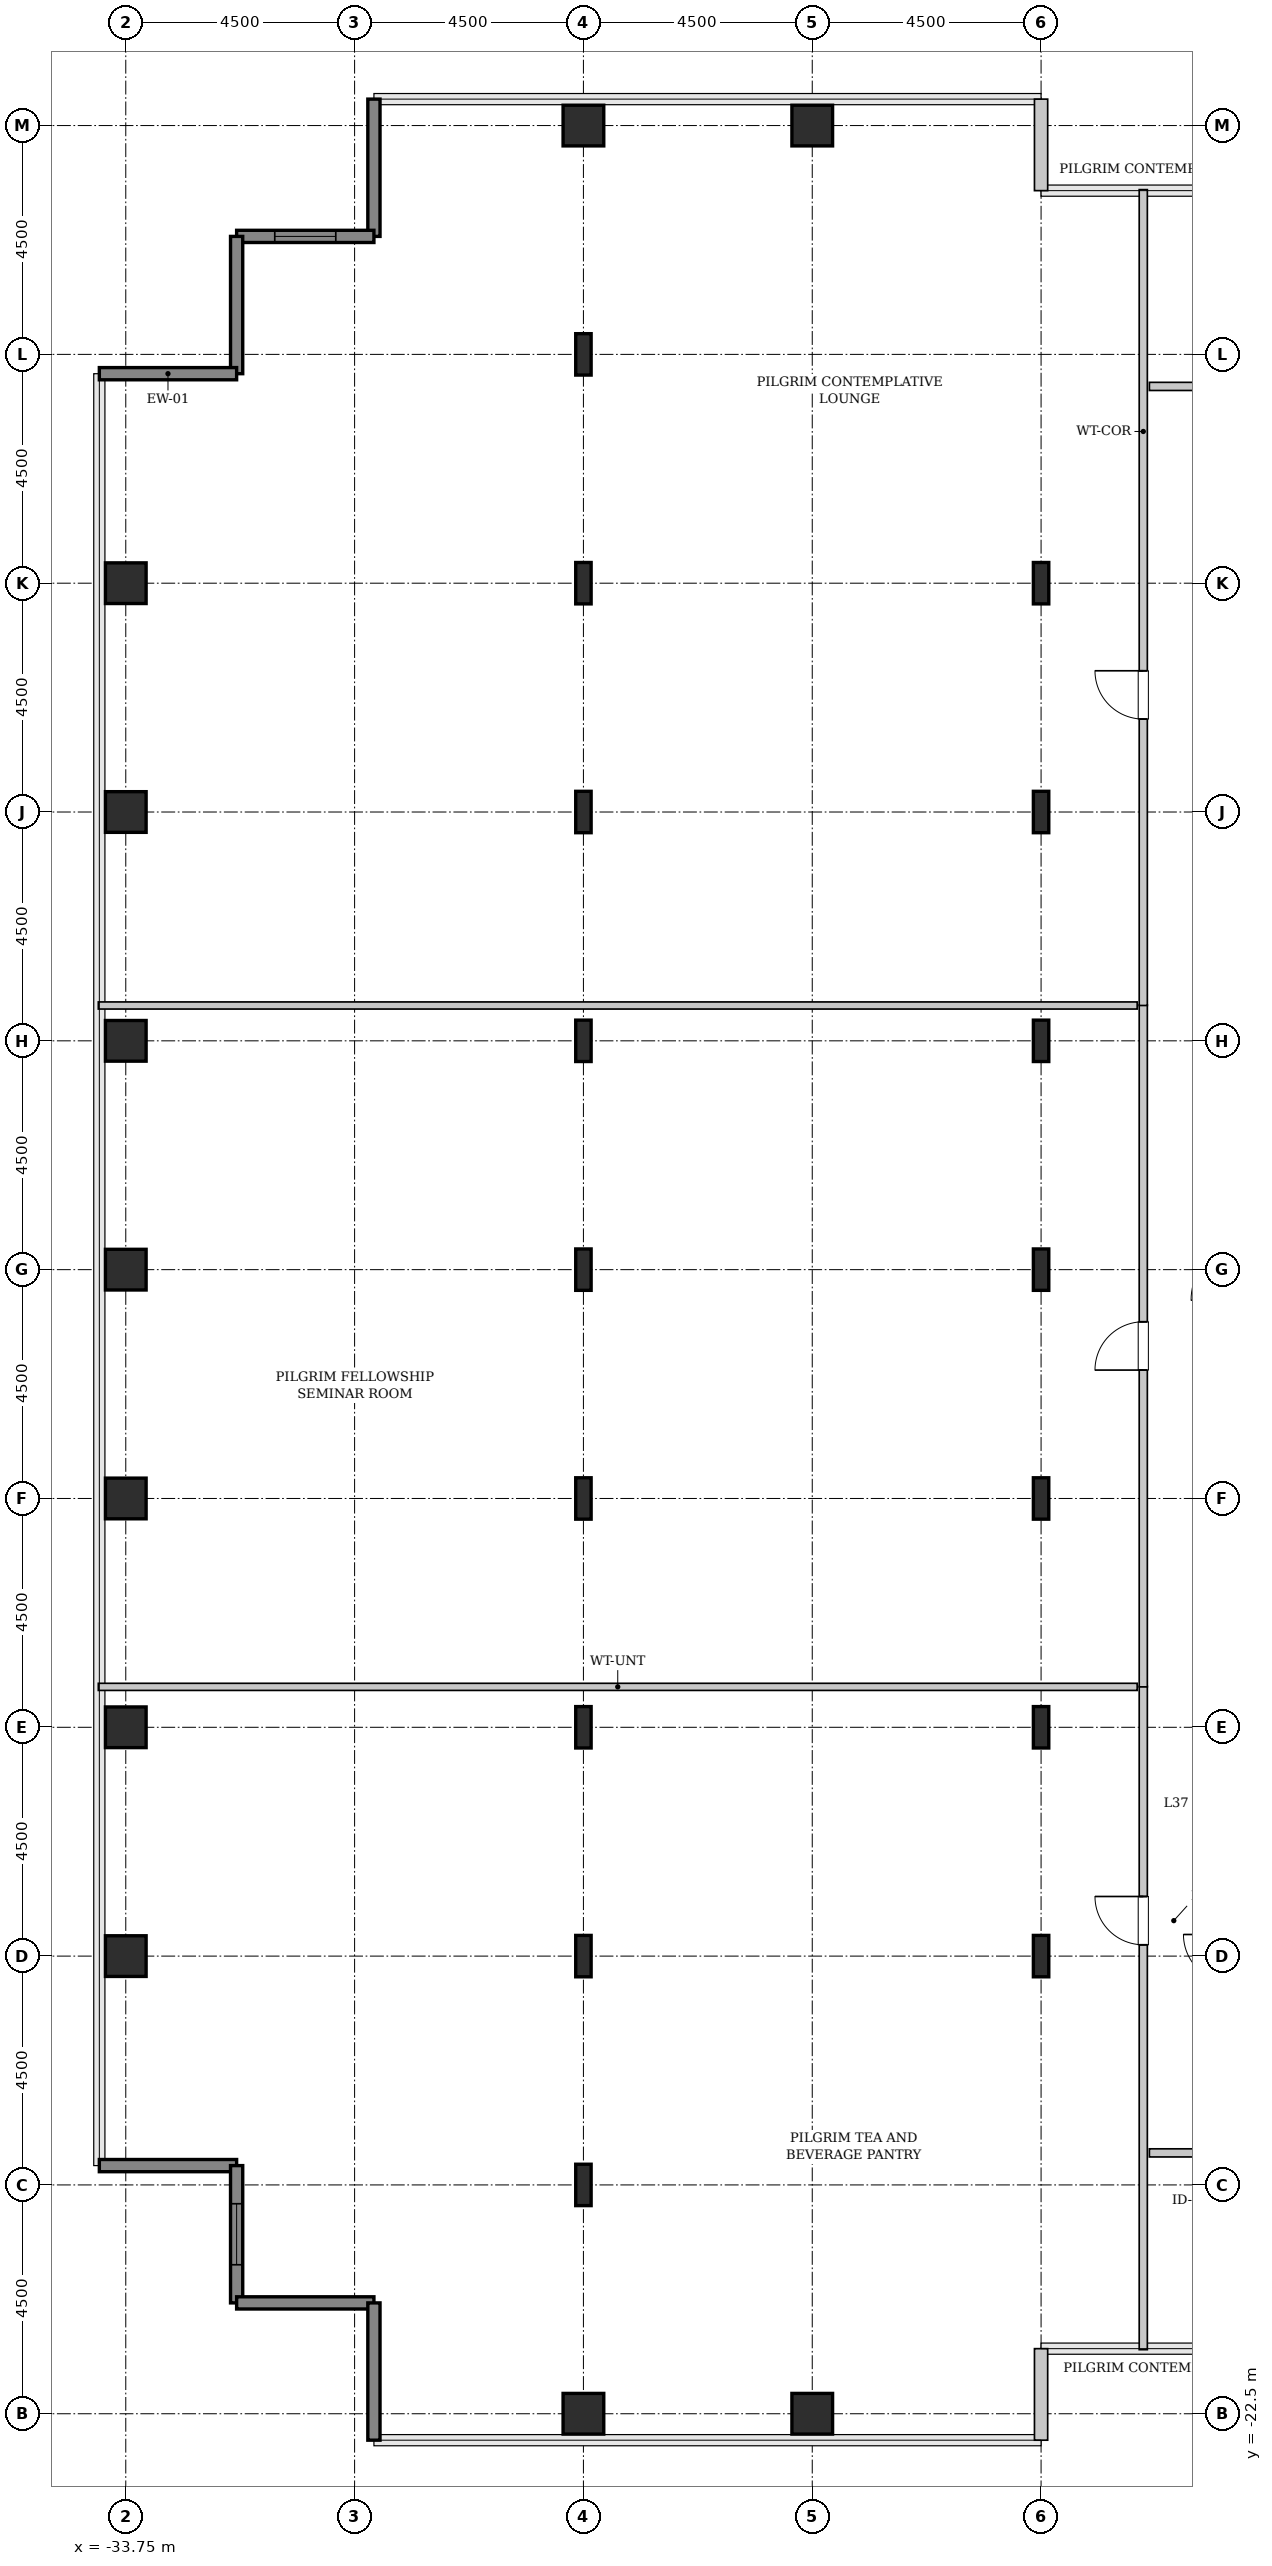
"""IFC4 building model, lengths in metres.
Left out: names, types, materials, properties, quantities, classifications, styles, units other than length and angle.
Written with IfcOpenShell. Run it as: python <this file> out.ifc"""

import sys

from ifc_helpers import new_model, si_unit, direction, frame, frame_2d, origin, origin_2d, place, context, subcontext, project, spatial, rectangle, hollow_rectangle, i_section, extrude, source, transform, mapped, element, fill, save


model = new_model("IFC4")
c1 = context("Model", 3, precision=1e-05, world=origin(), true_north=direction((0.0, 1.0)))
c2 = subcontext(c1, "Body", "Model", "MODEL_VIEW")
j1 = project(units=[si_unit("LENGTHUNIT", "METRE"), si_unit("PLANEANGLEUNIT", "RADIAN")], contexts=[c1])
p1 = place(None, origin())
s1 = spatial("IfcSite", under=j1, at=p1, CompositionType="ELEMENT")
p2 = place(p1, origin())
s2 = spatial("IfcBuilding", under=s1, at=p2, CompositionType="ELEMENT")
p3 = place(p2, frame((0.0, 0.0, 152.6)))
s3 = spatial("IfcBuildingStorey", under=s2, at=p3, CompositionType="ELEMENT", Elevation=152.6)
m1 = source(origin(), c2, "Body", "SweptSolid", [
    extrude(hollow_rectangle(XDim=0.8, YDim=0.8, WallThickness=0.04, InnerFilletRadius=0.04, OuterFilletRadius=0.08, at=origin_2d()), origin(), (0.0, 0.0, 1.0), 3.8),
])
for number, where, z_axis, x_axis in (
    (1, (-33.75, -13.5, 0.0), (0.0, 0.0, 1.0), (1.0, 0.0, 0.0)),
    (2, (-33.75, -9.0, 0.0), (0.0, 0.0, 1.0), (1.0, 0.0, 0.0)),
    (3, (-33.75, -4.5, 0.0), (0.0, 0.0, 1.0), (1.0, 0.0, 0.0)),
    (4, (-33.75, 0.0, 0.0), (0.0, 0.0, 1.0), (1.0, 0.0, 0.0)),
    (5, (-33.75, 4.5, 0.0), (0.0, 0.0, 1.0), (1.0, 0.0, 0.0)),
    (6, (-33.75, 9.0, 0.0), (0.0, 0.0, 1.0), (1.0, 0.0, 0.0)),
    (7, (-33.75, 13.5, 0.0), (0.0, 0.0, 1.0), (1.0, 0.0, 0.0)),
    (8, (-24.75, -22.5, 0.0), (0.0, 0.0, 1.0), (1.0, 0.0, 0.0)),
):
    element("IfcColumn", number, at=place(p3, frame(where, z_axis=z_axis, x_axis=x_axis)), inside=s3, PredefinedType="COLUMN", context=c2, shape_type="MappedRepresentation", body=[
        mapped(m1, transform((0.0, 0.0, 0.0), x_axis=(1.0, 0.0, 0.0), y_axis=(0.0, 1.0, 0.0), z_axis=(0.0, 0.0, 1.0), scale=1.0)),
    ])
m2 = source(origin(), c2, "Body", "SweptSolid", [
    extrude(i_section(OverallWidth=0.303, OverallDepth=0.814, WebThickness=0.021, FlangeThickness=0.04, FilletRadius=0.03, at=origin_2d()), origin(), (0.0, 0.0, 1.0), 3.8),
])
for number, where, z_axis, x_axis in (
    (9, (-24.75, -18.0, 0.0), (0.0, 0.0, 1.0), (1.0, 0.0, 0.0)),
    (10, (-24.75, -13.5, 0.0), (0.0, 0.0, 1.0), (1.0, 0.0, 0.0)),
    (11, (-24.75, -9.0, 0.0), (0.0, 0.0, 1.0), (1.0, 0.0, 0.0)),
    (12, (-24.75, -4.5, 0.0), (0.0, 0.0, 1.0), (1.0, 0.0, 0.0)),
    (13, (-24.75, 0.0, 0.0), (0.0, 0.0, 1.0), (1.0, 0.0, 0.0)),
    (14, (-24.75, 4.5, 0.0), (0.0, 0.0, 1.0), (1.0, 0.0, 0.0)),
    (15, (-24.75, 9.0, 0.0), (0.0, 0.0, 1.0), (1.0, 0.0, 0.0)),
    (16, (-24.75, 13.5, 0.0), (0.0, 0.0, 1.0), (1.0, 0.0, 0.0)),
    (17, (-24.75, 18.0, 0.0), (0.0, 0.0, 1.0), (1.0, 0.0, 0.0)),
):
    element("IfcColumn", number, at=place(p3, frame(where, z_axis=z_axis, x_axis=x_axis)), inside=s3, PredefinedType="COLUMN", context=c2, shape_type="MappedRepresentation", body=[
        mapped(m2, transform((0.0, 0.0, 0.0), x_axis=(1.0, 0.0, 0.0), y_axis=(0.0, 1.0, 0.0), z_axis=(0.0, 0.0, 1.0), scale=1.0)),
    ])
for number, where, z_axis, x_axis in (
    (18, (-24.75, 22.5, 0.0), (0.0, 0.0, 1.0), (1.0, 0.0, 0.0)),
    (19, (-20.25, -22.5, 0.0), (0.0, 0.0, 1.0), (1.0, 0.0, 0.0)),
    (20, (-20.25, 22.5, 0.0), (0.0, 0.0, 1.0), (1.0, 0.0, 0.0)),
):
    element("IfcColumn", number, at=place(p3, frame(where, z_axis=z_axis, x_axis=x_axis)), inside=s3, PredefinedType="COLUMN", context=c2, shape_type="MappedRepresentation", body=[
        mapped(m1, transform((0.0, 0.0, 0.0), x_axis=(1.0, 0.0, 0.0), y_axis=(0.0, 1.0, 0.0), z_axis=(0.0, 0.0, 1.0), scale=1.0)),
    ])
for number, where, z_axis, x_axis in (
    (21, (-15.75, -13.5, 0.0), (0.0, 0.0, 1.0), (1.0, 0.0, 0.0)),
    (22, (-15.75, -9.0, 0.0), (0.0, 0.0, 1.0), (1.0, 0.0, 0.0)),
    (23, (-15.75, -4.5, 0.0), (0.0, 0.0, 1.0), (1.0, 0.0, 0.0)),
    (24, (-15.75, 0.0, 0.0), (0.0, 0.0, 1.0), (1.0, 0.0, 0.0)),
    (25, (-15.75, 4.5, 0.0), (0.0, 0.0, 1.0), (1.0, 0.0, 0.0)),
    (26, (-15.75, 9.0, 0.0), (0.0, 0.0, 1.0), (1.0, 0.0, 0.0)),
    (27, (-15.75, 13.5, 0.0), (0.0, 0.0, 1.0), (1.0, 0.0, 0.0)),
):
    element("IfcColumn", number, at=place(p3, frame(where, z_axis=z_axis, x_axis=x_axis)), inside=s3, PredefinedType="COLUMN", context=c2, shape_type="MappedRepresentation", body=[
        mapped(m2, transform((0.0, 0.0, 0.0), x_axis=(1.0, 0.0, 0.0), y_axis=(0.0, 1.0, 0.0), z_axis=(0.0, 0.0, 1.0), scale=1.0)),
    ])
m3 = source(origin(), c2, "Body", "SweptSolid", [
    extrude(rectangle(XDim=1.8, YDim=0.26, at=frame_2d((0.9, 0.0))), origin(), (0.0, 0.0, 1.0), 3.55),
])
p4 = place(p3, frame((-15.75, 21.22, 0.0), z_axis=(0.0, 0.0, 1.0), x_axis=(0.0, 1.0, 0.0)))
e28 = element("IfcWall", 28, at=p4, inside=s3, PredefinedType="SOLIDWALL", context=c2, shape_type="MappedRepresentation", body=[
    mapped(m3, transform((0.0, 0.0, 0.0), x_axis=(1.0, 0.0, 0.0), y_axis=(0.0, 1.0, 0.0), z_axis=(0.0, 0.0, 1.0), scale=1.0)),
])
m4 = source(origin(), c2, "Body", "SweptSolid", [
    extrude(rectangle(XDim=2.7, YDim=0.24, at=frame_2d((1.35, 0.0))), origin(), (0.0, 0.0, 1.0), 3.55),
])
p5 = place(p3, frame((-28.87, 23.02, 0.0), z_axis=(0.0, 0.0, 1.0), x_axis=(0.0, -1.0, 0.0)))
e29 = element("IfcWall", 29, at=p5, inside=s3, PredefinedType="SHEAR", context=c2, shape_type="MappedRepresentation", body=[
    mapped(m4, transform((0.0, 0.0, 0.0), x_axis=(1.0, 0.0, 0.0), y_axis=(0.0, 1.0, 0.0), z_axis=(0.0, 0.0, 1.0), scale=1.0)),
])
p6 = place(p3, frame((-28.87, 20.32, 0.0), z_axis=(0.0, 0.0, 1.0), x_axis=(-1.0, 0.0, 0.0)))
e30 = element("IfcWall", 30, at=p6, inside=s3, PredefinedType="SHEAR", context=c2, shape_type="MappedRepresentation", body=[
    mapped(m4, transform((0.0, 0.0, 0.0), x_axis=(1.0, 0.0, 0.0), y_axis=(0.0, 1.0, 0.0), z_axis=(0.0, 0.0, 1.0), scale=1.0)),
])
p7 = place(p6, frame((0.75, 0.0, 0.85)))
e31 = element("IfcOpeningElement", 31, at=p7, cuts=e30, PredefinedType="OPENING", context=c2, shape_type="SweptSolid", body=[
    extrude(rectangle(XDim=1.2, YDim=1.8, at=frame_2d((0.6, 0.9))), frame((0.0, 0.13, 0.0), z_axis=(0.0, -1.0, 0.0), x_axis=(1.0, 0.0, 0.0)), (0.0, 0.0, 1.0), 0.26),
])
for number, where, z_axis, x_axis in (
    (32, (-31.57, 20.32, 0.0), (0.0, 0.0, 1.0), (0.0, -1.0, 0.0)),
    (33, (-31.57, 17.62, 0.0), (0.0, 0.0, 1.0), (-1.0, 0.0, 0.0)),
    (34, (-34.27, -17.62, 0.0), (0.0, 0.0, 1.0), (1.0, 0.0, 0.0)),
):
    element("IfcWall", number, at=place(p3, frame(where, z_axis=z_axis, x_axis=x_axis)), inside=s3, PredefinedType="SHEAR", context=c2, shape_type="MappedRepresentation", body=[
        mapped(m4, transform((0.0, 0.0, 0.0), x_axis=(1.0, 0.0, 0.0), y_axis=(0.0, 1.0, 0.0), z_axis=(0.0, 0.0, 1.0), scale=1.0)),
    ])
p8 = place(p3, frame((-31.57, -17.62, 0.0), z_axis=(0.0, 0.0, 1.0), x_axis=(0.0, -1.0, 0.0)))
e35 = element("IfcWall", 35, at=p8, inside=s3, PredefinedType="SHEAR", context=c2, shape_type="MappedRepresentation", body=[
    mapped(m4, transform((0.0, 0.0, 0.0), x_axis=(1.0, 0.0, 0.0), y_axis=(0.0, 1.0, 0.0), z_axis=(0.0, 0.0, 1.0), scale=1.0)),
])
p9 = place(p8, frame((0.75, 0.0, 0.85)))
e36 = element("IfcOpeningElement", 36, at=p9, cuts=e35, PredefinedType="OPENING", context=c2, shape_type="SweptSolid", body=[
    extrude(rectangle(XDim=1.2, YDim=1.8, at=frame_2d((0.6, 0.9))), frame((0.0, 0.13, 0.0), z_axis=(0.0, -1.0, 0.0), x_axis=(1.0, 0.0, 0.0)), (0.0, 0.0, 1.0), 0.26),
])
for number, where, z_axis, x_axis in (
    (37, (-31.57, -20.32, 0.0), (0.0, 0.0, 1.0), (1.0, 0.0, 0.0)),
    (38, (-28.87, -20.32, 0.0), (0.0, 0.0, 1.0), (0.0, -1.0, 0.0)),
):
    element("IfcWall", number, at=place(p3, frame(where, z_axis=z_axis, x_axis=x_axis)), inside=s3, PredefinedType="SHEAR", context=c2, shape_type="MappedRepresentation", body=[
        mapped(m4, transform((0.0, 0.0, 0.0), x_axis=(1.0, 0.0, 0.0), y_axis=(0.0, 1.0, 0.0), z_axis=(0.0, 0.0, 1.0), scale=1.0)),
    ])
p10 = place(p3, frame((-15.75, -23.02, 0.0), z_axis=(0.0, 0.0, 1.0), x_axis=(0.0, 1.0, 0.0)))
e39 = element("IfcWall", 39, at=p10, inside=s3, PredefinedType="SOLIDWALL", context=c2, shape_type="MappedRepresentation", body=[
    mapped(m3, transform((0.0, 0.0, 0.0), x_axis=(1.0, 0.0, 0.0), y_axis=(0.0, 1.0, 0.0), z_axis=(0.0, 0.0, 1.0), scale=1.0)),
])
m5 = source(origin(), c2, "Body", "SweptSolid", [
    extrude(rectangle(XDim=13.045, YDim=0.16, at=frame_2d((6.522, 0.0))), origin(), (0.0, 0.0, 1.0), 3.535),
])
p11 = place(p3, frame((-13.74, -21.24, 0.0), z_axis=(0.0, 0.0, 1.0), x_axis=(0.0, 1.0, 0.0)))
e40 = element("IfcWall", 40, at=p11, inside=s3, PredefinedType="PARTITIONING", context=c2, shape_type="MappedRepresentation", body=[
    mapped(m5, transform((0.0, 0.0, 0.0), x_axis=(1.0, 0.0, 0.0), y_axis=(0.0, 1.0, 0.0), z_axis=(0.0, 0.0, 1.0), scale=1.0)),
])
p12 = place(p11, frame((7.962, 0.0, 0.0)))
e41 = element("IfcOpeningElement", 41, at=p12, cuts=e40, PredefinedType="OPENING", context=c2, shape_type="SweptSolid", body=[
    extrude(rectangle(XDim=0.95, YDim=2.1, at=frame_2d((0.475, 1.05))), frame((0.0, 0.09, 0.0), z_axis=(0.0, -1.0, 0.0), x_axis=(1.0, 0.0, 0.0)), (0.0, 0.0, 1.0), 0.18),
])
m6 = source(origin(), c2, "Body", "SweptSolid", [
    extrude(rectangle(XDim=20.43, YDim=0.14, at=frame_2d((10.215, 0.0))), origin(), (0.0, 0.0, 1.0), 3.535),
])
p13 = place(p3, frame((-34.29, -8.205, 0.0), z_axis=(0.0, 0.0, 1.0), x_axis=(1.0, 0.0, 0.0)))
e42 = element("IfcWall", 42, at=p13, inside=s3, PredefinedType="PARTITIONING", context=c2, shape_type="MappedRepresentation", body=[
    mapped(m6, transform((0.0, 0.0, 0.0), x_axis=(1.0, 0.0, 0.0), y_axis=(0.0, 1.0, 0.0), z_axis=(0.0, 0.0, 1.0), scale=1.0)),
])
m7 = source(origin(), c2, "Body", "SweptSolid", [
    extrude(rectangle(XDim=13.41, YDim=0.16, at=frame_2d((6.705, 0.0))), origin(), (0.0, 0.0, 1.0), 3.535),
])
p14 = place(p3, frame((-13.74, -8.205, 0.0), z_axis=(0.0, 0.0, 1.0), x_axis=(0.0, 1.0, 0.0)))
e43 = element("IfcWall", 43, at=p14, inside=s3, PredefinedType="PARTITIONING", context=c2, shape_type="MappedRepresentation", body=[
    mapped(m7, transform((0.0, 0.0, 0.0), x_axis=(1.0, 0.0, 0.0), y_axis=(0.0, 1.0, 0.0), z_axis=(0.0, 0.0, 1.0), scale=1.0)),
])
p15 = place(p14, frame((6.23, 0.0, 0.0)))
e44 = element("IfcOpeningElement", 44, at=p15, cuts=e43, PredefinedType="OPENING", context=c2, shape_type="SweptSolid", body=[
    extrude(rectangle(XDim=0.95, YDim=2.1, at=frame_2d((0.475, 1.05))), frame((0.0, 0.09, 0.0), z_axis=(0.0, -1.0, 0.0), x_axis=(1.0, 0.0, 0.0)), (0.0, 0.0, 1.0), 0.18),
])
p16 = place(p3, frame((-34.29, 5.195, 0.0), z_axis=(0.0, 0.0, 1.0), x_axis=(1.0, 0.0, 0.0)))
e45 = element("IfcWall", 45, at=p16, inside=s3, PredefinedType="PARTITIONING", context=c2, shape_type="MappedRepresentation", body=[
    mapped(m6, transform((0.0, 0.0, 0.0), x_axis=(1.0, 0.0, 0.0), y_axis=(0.0, 1.0, 0.0), z_axis=(0.0, 0.0, 1.0), scale=1.0)),
])
m8 = source(origin(), c2, "Body", "SweptSolid", [
    extrude(rectangle(XDim=16.045, YDim=0.16, at=frame_2d((8.022, 0.0))), origin(), (0.0, 0.0, 1.0), 3.535),
])
p17 = place(p3, frame((-13.74, 5.195, 0.0), z_axis=(0.0, 0.0, 1.0), x_axis=(0.0, 1.0, 0.0)))
e46 = element("IfcWall", 46, at=p17, inside=s3, PredefinedType="PARTITIONING", context=c2, shape_type="MappedRepresentation", body=[
    mapped(m8, transform((0.0, 0.0, 0.0), x_axis=(1.0, 0.0, 0.0), y_axis=(0.0, 1.0, 0.0), z_axis=(0.0, 0.0, 1.0), scale=1.0)),
])
p18 = place(p17, frame((5.633, 0.0, 0.0)))
e47 = element("IfcOpeningElement", 47, at=p18, cuts=e46, PredefinedType="OPENING", context=c2, shape_type="SweptSolid", body=[
    extrude(rectangle(XDim=0.95, YDim=2.1, at=frame_2d((0.475, 1.05))), frame((0.0, 0.09, 0.0), z_axis=(0.0, -1.0, 0.0), x_axis=(1.0, 0.0, 0.0)), (0.0, 0.0, 1.0), 0.18),
])
m9 = source(origin(), c2, "Body", "SweptSolid", [
    extrude(rectangle(XDim=4.16, YDim=0.16, at=frame_2d((2.08, 0.0))), origin(), (0.0, 0.0, 1.0), 3.535),
])
p19 = place(p3, frame((-13.62, 17.37, 0.0), z_axis=(0.0, 0.0, 1.0), x_axis=(1.0, 0.0, 0.0)))
e48 = element("IfcWall", 48, at=p19, inside=s3, PredefinedType="PARTITIONING", context=c2, shape_type="MappedRepresentation", body=[
    mapped(m9, transform((0.0, 0.0, 0.0), x_axis=(1.0, 0.0, 0.0), y_axis=(0.0, 1.0, 0.0), z_axis=(0.0, 0.0, 1.0), scale=1.0)),
])
p20 = place(p19, frame((0.969, 0.0, 0.0)))
e49 = element("IfcOpeningElement", 49, at=p20, cuts=e48, PredefinedType="OPENING", context=c2, shape_type="SweptSolid", body=[
    extrude(rectangle(XDim=0.95, YDim=2.1, at=frame_2d((0.475, 1.05))), frame((0.0, 0.09, 0.0), z_axis=(0.0, -1.0, 0.0), x_axis=(1.0, 0.0, 0.0)), (0.0, 0.0, 1.0), 0.18),
])
m10 = source(origin(), c2, "Body", "SweptSolid", [
    extrude(rectangle(XDim=4.425, YDim=0.16, at=frame_2d((2.212, 0.0))), origin(), (0.0, 0.0, 1.0), 3.535),
])
p21 = place(p3, frame((-13.62, -17.37, 0.0), z_axis=(0.0, 0.0, 1.0), x_axis=(1.0, 0.0, 0.0)))
e50 = element("IfcWall", 50, at=p21, inside=s3, PredefinedType="PARTITIONING", context=c2, shape_type="MappedRepresentation", body=[
    mapped(m10, transform((0.0, 0.0, 0.0), x_axis=(1.0, 0.0, 0.0), y_axis=(0.0, 1.0, 0.0), z_axis=(0.0, 0.0, 1.0), scale=1.0)),
])
p22 = place(p21, frame((1.038, 0.0, 0.0)))
e51 = element("IfcOpeningElement", 51, at=p22, cuts=e50, PredefinedType="OPENING", context=c2, shape_type="SweptSolid", body=[
    extrude(rectangle(XDim=0.95, YDim=2.1, at=frame_2d((0.475, 1.05))), frame((0.0, 0.09, 0.0), z_axis=(0.0, -1.0, 0.0), x_axis=(1.0, 0.0, 0.0)), (0.0, 0.0, 1.0), 0.18),
])
m11 = source(origin(), c2, "Body", "SweptSolid", [
    extrude(rectangle(XDim=1.2, YDim=1.8, at=frame_2d((0.6, 0.9))), frame((0.0, 0.03, 0.0), z_axis=(0.0, -1.0, 0.0), x_axis=(1.0, 0.0, 0.0)), (0.0, 0.0, 1.0), 0.06),
])
p23 = place(p7, origin())
e52 = element("IfcWindow", 52, at=p23, inside=s3, PartitioningType="SINGLE_PANEL", PredefinedType="WINDOW", context=c2, shape_type="MappedRepresentation", body=[
    mapped(m11, transform((0.0, 0.0, 0.0), x_axis=(1.0, 0.0, 0.0), y_axis=(0.0, 1.0, 0.0), z_axis=(0.0, 0.0, 1.0), scale=1.0)),
])
fill(e31, e52)
p24 = place(p9, origin())
e53 = element("IfcWindow", 53, at=p24, inside=s3, PartitioningType="SINGLE_PANEL", PredefinedType="WINDOW", context=c2, shape_type="MappedRepresentation", body=[
    mapped(m11, transform((0.0, 0.0, 0.0), x_axis=(1.0, 0.0, 0.0), y_axis=(0.0, 1.0, 0.0), z_axis=(0.0, 0.0, 1.0), scale=1.0)),
])
fill(e36, e53)
m12 = source(origin(), c2, "Body", "SweptSolid", [
    extrude(rectangle(XDim=0.95, YDim=2.1, at=frame_2d((0.475, 1.05))), frame((0.0, 0.025, 0.0), z_axis=(0.0, -1.0, 0.0), x_axis=(1.0, 0.0, 0.0)), (0.0, 0.0, 1.0), 0.05),
])
p25 = place(p12, origin())
e54 = element("IfcDoor", 54, at=p25, inside=s3, OperationType="SINGLE_SWING_RIGHT", PredefinedType="DOOR", context=c2, shape_type="MappedRepresentation", body=[
    mapped(m12, transform((0.0, 0.0, 0.0), x_axis=(1.0, 0.0, 0.0), y_axis=(0.0, 1.0, 0.0), z_axis=(0.0, 0.0, 1.0), scale=1.0)),
])
fill(e41, e54)
p26 = place(p15, origin())
e55 = element("IfcDoor", 55, at=p26, inside=s3, OperationType="SINGLE_SWING_LEFT", PredefinedType="DOOR", context=c2, shape_type="MappedRepresentation", body=[
    mapped(m12, transform((0.0, 0.0, 0.0), x_axis=(1.0, 0.0, 0.0), y_axis=(0.0, 1.0, 0.0), z_axis=(0.0, 0.0, 1.0), scale=1.0)),
])
fill(e44, e55)
p27 = place(p18, origin())
e56 = element("IfcDoor", 56, at=p27, inside=s3, OperationType="SINGLE_SWING_RIGHT", PredefinedType="DOOR", context=c2, shape_type="MappedRepresentation", body=[
    mapped(m12, transform((0.0, 0.0, 0.0), x_axis=(1.0, 0.0, 0.0), y_axis=(0.0, 1.0, 0.0), z_axis=(0.0, 0.0, 1.0), scale=1.0)),
])
fill(e47, e56)
save(model, sys.argv[1])
